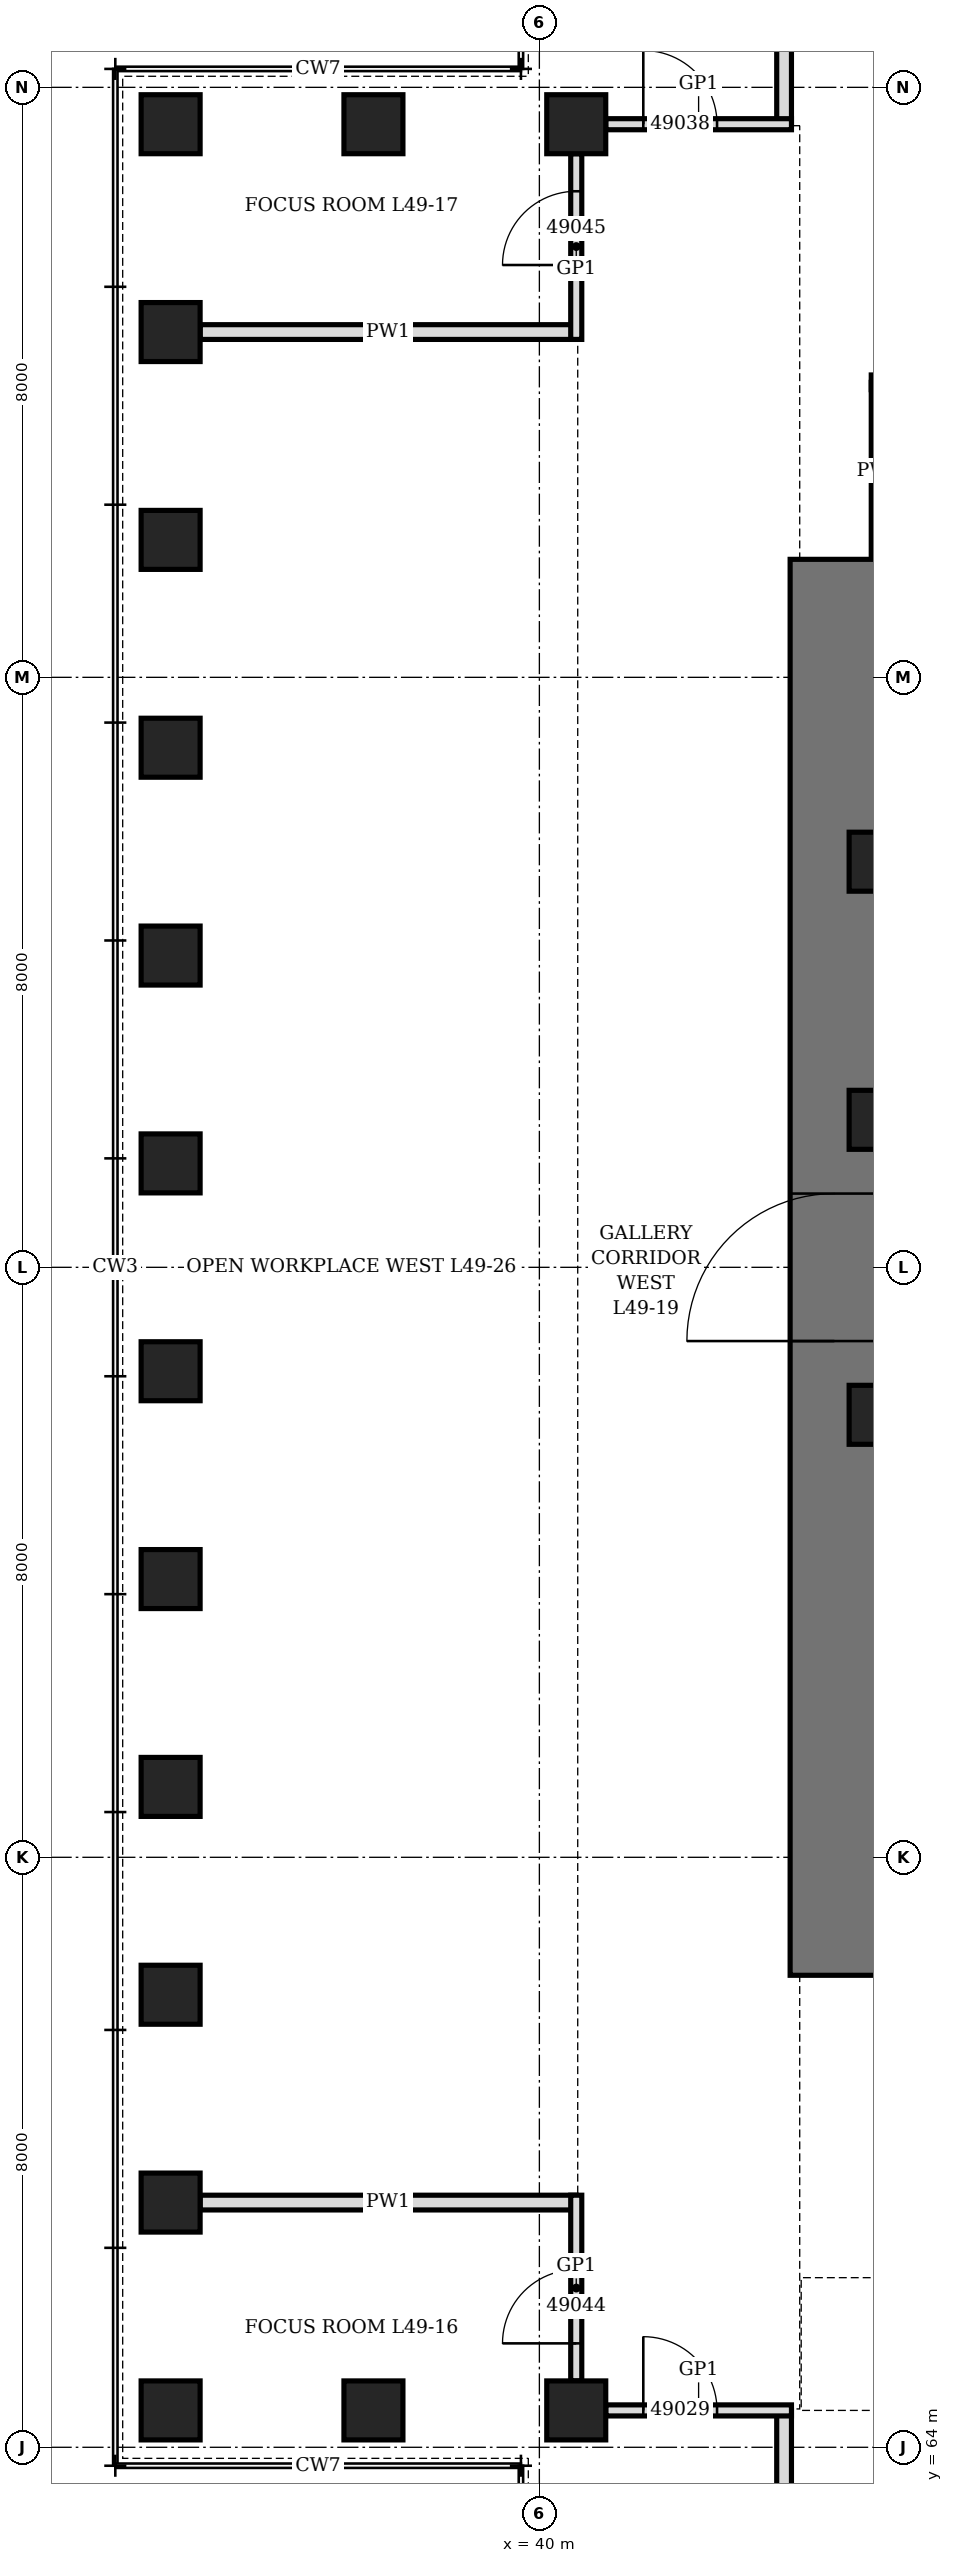
"""IFC4 building model, lengths in metres.
Left out: names, types, materials, properties, quantities, classifications, styles, units other than length and angle.
Written with IfcOpenShell. Run it as: python <this file> out.ifc"""

import sys

from ifc_helpers import new_model, si_unit, direction, frame, frame_2d, origin, origin_2d, place, context, subcontext, project, spatial, rectangle, hollow_rectangle, extrude, element, fill, save


model = new_model("IFC4")
c1 = context("Model", 3, precision=1e-05, world=origin(), true_north=direction((0.0, 1.0)))
c2 = subcontext(c1, "Body", "Model", "MODEL_VIEW")
j1 = project(units=[si_unit("LENGTHUNIT", "METRE"), si_unit("PLANEANGLEUNIT", "RADIAN")], contexts=[c1])
p1 = place(None, origin())
s1 = spatial("IfcSite", under=j1, at=p1, CompositionType="ELEMENT")
p2 = place(p1, origin())
s2 = spatial("IfcBuilding", under=s1, at=p2, CompositionType="ELEMENT")
p3 = place(p2, frame((0.0, 0.0, 219.1)))
s3 = spatial("IfcBuildingStorey", under=s2, at=p3, CompositionType="ELEMENT", Elevation=219.1)
for number, where, z_axis, x_axis in (
    (1, (40.5, 95.5, 0.0), (0.0, 0.0, 1.0), (1.0, 0.0, 0.0)),
    (2, (37.75, 95.5, 0.0), (0.0, 0.0, 1.0), (1.0, 0.0, 0.0)),
    (3, (35.0, 95.5, 0.0), (0.0, 0.0, 1.0), (0.0, 1.0, 0.0)),
    (4, (35.0, 92.682, 0.0), (0.0, 0.0, 1.0), (0.0, 1.0, 0.0)),
    (5, (35.0, 89.864, 0.0), (0.0, 0.0, 1.0), (0.0, 1.0, 0.0)),
    (6, (35.0, 87.045, 0.0), (0.0, 0.0, 1.0), (0.0, 1.0, 0.0)),
    (7, (35.0, 84.227, 0.0), (0.0, 0.0, 1.0), (0.0, 1.0, 0.0)),
    (8, (35.0, 81.409, 0.0), (0.0, 0.0, 1.0), (0.0, 1.0, 0.0)),
    (9, (35.0, 78.591, 0.0), (0.0, 0.0, 1.0), (0.0, 1.0, 0.0)),
    (10, (35.0, 75.773, 0.0), (0.0, 0.0, 1.0), (0.0, 1.0, 0.0)),
    (11, (35.0, 72.955, 0.0), (0.0, 0.0, 1.0), (0.0, 1.0, 0.0)),
    (12, (35.0, 70.136, 0.0), (0.0, 0.0, 1.0), (0.0, 1.0, 0.0)),
    (13, (35.0, 67.318, 0.0), (0.0, 0.0, 1.0), (0.0, 1.0, 0.0)),
    (14, (35.0, 64.5, 0.0), (0.0, 0.0, 1.0), (1.0, 0.0, 0.0)),
    (15, (37.75, 64.5, 0.0), (0.0, 0.0, 1.0), (1.0, 0.0, 0.0)),
    (16, (40.5, 64.5, 0.0), (0.0, 0.0, 1.0), (0.0, 1.0, 0.0)),
):
    element("IfcColumn", number, at=place(p3, frame(where, z_axis=z_axis, x_axis=x_axis)), inside=s3, PredefinedType="COLUMN", context=c2, shape_type="SweptSolid", body=[
        extrude(hollow_rectangle(XDim=0.8, YDim=0.8, WallThickness=0.08, at=origin_2d()), origin(), (0.0, 0.0, 1.0), 4.2),
    ])
p4 = place(p3, frame((44.0, 70.4, 0.0), z_axis=(0.0, 0.0, 1.0), x_axis=(0.0, 1.0, 0.0)))
e17 = element("IfcWall", 17, at=p4, inside=s3, PredefinedType="SHEAR", context=c2, shape_type="SweptSolid", body=[
    extrude(rectangle(XDim=19.2, YDim=1.2, at=frame_2d((9.6, 0.0))), origin(), (0.0, 0.0, 1.0), 4.2),
])
p5 = place(p4, frame((8.6, 0.0, 0.0)))
e18 = element("IfcOpeningElement", 18, at=p5, cuts=e17, PredefinedType="OPENING", context=c2, shape_type="SweptSolid", body=[
    extrude(rectangle(XDim=2.0, YDim=2.4, at=frame_2d((1.0, 1.2))), frame((0.0, 0.61, 0.0), z_axis=(0.0, -1.0, 0.0), x_axis=(1.0, 0.0, 0.0)), (0.0, 0.0, 1.0), 1.22),
])
for number, where, z_axis, x_axis in (
    (19, (44.6, 78.0, 0.0), (0.0, 0.0, 1.0), (1.0, 0.0, 0.0)),
    (20, (44.6, 82.0, 0.0), (0.0, 0.0, 1.0), (1.0, 0.0, 0.0)),
    (21, (44.6, 85.5, 0.0), (0.0, 0.0, 1.0), (1.0, 0.0, 0.0)),
):
    element("IfcColumn", number, at=place(p3, frame(where, z_axis=z_axis, x_axis=x_axis)), inside=s3, PredefinedType="COLUMN", context=c2, shape_type="SweptSolid", body=[
        extrude(hollow_rectangle(XDim=0.8, YDim=0.8, WallThickness=0.1, at=origin_2d()), origin(), (0.0, 0.0, 1.0), 4.2),
    ])
for number, where, z_axis, x_axis in (
    (22, (43.318, 59.4, 0.0), (0.0, 0.0, 1.0), (0.0, 1.0, 0.0)),
    (23, (43.318, 95.5, 0.0), (0.0, 0.0, 1.0), (0.0, 1.0, 0.0)),
    (24, (35.4, 67.318, 0.0), (0.0, 0.0, 1.0), (1.0, 0.0, 0.0)),
    (25, (35.4, 92.682, 0.0), (0.0, 0.0, 1.0), (1.0, 0.0, 0.0)),
):
    element("IfcWall", number, at=place(p3, frame(where, z_axis=z_axis, x_axis=x_axis)), inside=s3, PredefinedType="PARTITIONING", context=c2, shape_type="SweptSolid", body=[
        extrude(rectangle(XDim=5.1, YDim=0.2, at=frame_2d((2.55, 0.0))), origin(), (0.0, 0.0, 1.0), 3.428),
    ])
p6 = place(p3, frame((44.6, 89.6, 0.0), z_axis=(0.0, 0.0, 1.0), x_axis=(0.0, 1.0, 0.0)))
e26 = element("IfcWall", 26, at=p6, inside=s3, PredefinedType="PARTITIONING", context=c2, shape_type="SweptSolid", body=[
    extrude(rectangle(XDim=2.4, YDim=0.2, at=frame_2d((1.2, 0.0))), origin(), (0.0, 0.0, 1.0), 4.04),
])
p7 = place(p3, frame((40.9, 64.5, 0.0), z_axis=(0.0, 0.0, 1.0), x_axis=(1.0, 0.0, 0.0)))
e27 = element("IfcWall", 27, at=p7, inside=s3, PredefinedType="PARTITIONING", context=c2, shape_type="SweptSolid", body=[
    extrude(rectangle(XDim=2.518, YDim=0.15, at=frame_2d((1.259, 0.0))), origin(), (0.0, 0.0, 1.0), 4.04),
])
p8 = place(p7, frame((0.509, 0.0, 0.0)))
e28 = element("IfcOpeningElement", 28, at=p8, cuts=e27, PredefinedType="OPENING", context=c2, shape_type="SweptSolid", body=[
    extrude(rectangle(XDim=1.0, YDim=2.4, at=frame_2d((0.5, 1.2))), frame((0.0, 0.085, 0.0), z_axis=(0.0, -1.0, 0.0), x_axis=(1.0, 0.0, 0.0)), (0.0, 0.0, 1.0), 0.17),
])
p9 = place(p3, frame((44.5, 92.0, 0.0), z_axis=(0.0, 0.0, 1.0), x_axis=(1.0, 0.0, 0.0)))
e29 = element("IfcWall", 29, at=p9, inside=s3, PredefinedType="PARTITIONING", context=c2, shape_type="SweptSolid", body=[
    extrude(rectangle(XDim=6.4, YDim=0.2, at=frame_2d((3.2, 0.0))), origin(), (0.0, 0.0, 1.0), 4.04),
])
p10 = place(p9, frame((2.7, 0.0, 0.0)))
e30 = element("IfcOpeningElement", 30, at=p10, cuts=e29, PredefinedType="OPENING", context=c2, shape_type="SweptSolid", body=[
    extrude(rectangle(XDim=1.0, YDim=2.1, at=frame_2d((0.5, 1.05))), frame((0.0, 0.11, 0.0), z_axis=(0.0, -1.0, 0.0), x_axis=(1.0, 0.0, 0.0)), (0.0, 0.0, 1.0), 0.22),
])
p11 = place(p3, frame((40.9, 95.5, 0.0), z_axis=(0.0, 0.0, 1.0), x_axis=(1.0, 0.0, 0.0)))
e31 = element("IfcWall", 31, at=p11, inside=s3, PredefinedType="PARTITIONING", context=c2, shape_type="SweptSolid", body=[
    extrude(rectangle(XDim=2.518, YDim=0.15, at=frame_2d((1.259, 0.0))), origin(), (0.0, 0.0, 1.0), 4.04),
])
p12 = place(p11, frame((0.509, 0.0, 0.0)))
e32 = element("IfcOpeningElement", 32, at=p12, cuts=e31, PredefinedType="OPENING", context=c2, shape_type="SweptSolid", body=[
    extrude(rectangle(XDim=1.0, YDim=2.4, at=frame_2d((0.5, 1.2))), frame((0.0, 0.085, 0.0), z_axis=(0.0, -1.0, 0.0), x_axis=(1.0, 0.0, 0.0)), (0.0, 0.0, 1.0), 0.17),
])
p13 = place(p3, frame((40.5, 64.9, 0.0), z_axis=(0.0, 0.0, 1.0), x_axis=(0.0, 1.0, 0.0)))
e33 = element("IfcWall", 33, at=p13, inside=s3, PredefinedType="PARTITIONING", context=c2, shape_type="SweptSolid", body=[
    extrude(rectangle(XDim=2.518, YDim=0.15, at=frame_2d((1.259, 0.0))), origin(), (0.0, 0.0, 1.0), 4.04),
])
p14 = place(p13, frame((0.509, 0.0, 0.0)))
e34 = element("IfcOpeningElement", 34, at=p14, cuts=e33, PredefinedType="OPENING", context=c2, shape_type="SweptSolid", body=[
    extrude(rectangle(XDim=1.0, YDim=2.4, at=frame_2d((0.5, 1.2))), frame((0.0, 0.085, 0.0), z_axis=(0.0, -1.0, 0.0), x_axis=(1.0, 0.0, 0.0)), (0.0, 0.0, 1.0), 0.17),
])
p15 = place(p3, frame((40.5, 92.582, 0.0), z_axis=(0.0, 0.0, 1.0), x_axis=(0.0, 1.0, 0.0)))
e35 = element("IfcWall", 35, at=p15, inside=s3, PredefinedType="PARTITIONING", context=c2, shape_type="SweptSolid", body=[
    extrude(rectangle(XDim=2.518, YDim=0.15, at=frame_2d((1.259, 0.0))), origin(), (0.0, 0.0, 1.0), 4.04),
])
p16 = place(p15, frame((1.009, 0.0, 0.0)))
e36 = element("IfcOpeningElement", 36, at=p16, cuts=e35, PredefinedType="OPENING", context=c2, shape_type="SweptSolid", body=[
    extrude(rectangle(XDim=1.0, YDim=2.4, at=frame_2d((0.5, 1.2))), frame((0.0, 0.085, 0.0), z_axis=(0.0, -1.0, 0.0), x_axis=(1.0, 0.0, 0.0)), (0.0, 0.0, 1.0), 0.17),
])
p17 = place(p5, origin())
e37 = element("IfcDoor", 37, at=p17, inside=s3, OperationType="DOUBLE_DOOR_SINGLE_SWING", PredefinedType="DOOR", context=c2, shape_type="SweptSolid", body=[
    extrude(rectangle(XDim=2.0, YDim=2.4, at=frame_2d((1.0, 1.2))), frame((0.0, 0.35, 0.0), z_axis=(0.0, -1.0, 0.0), x_axis=(1.0, 0.0, 0.0)), (0.0, 0.0, 1.0), 0.7),
])
fill(e18, e37)
p18 = place(p8, origin())
e38 = element("IfcDoor", 38, at=p18, inside=s3, OperationType="SINGLE_SWING_RIGHT", PredefinedType="DOOR", context=c2, shape_type="SweptSolid", body=[
    extrude(rectangle(XDim=1.0, YDim=2.4, at=frame_2d((0.5, 1.2))), frame((0.0, 0.075, 0.0), z_axis=(0.0, -1.0, 0.0), x_axis=(1.0, 0.0, 0.0)), (0.0, 0.0, 1.0), 0.149),
])
fill(e28, e38)
p19 = place(p12, origin())
e39 = element("IfcDoor", 39, at=p19, inside=s3, OperationType="SINGLE_SWING_RIGHT", PredefinedType="DOOR", context=c2, shape_type="SweptSolid", body=[
    extrude(rectangle(XDim=1.0, YDim=2.4, at=frame_2d((0.5, 1.2))), frame((0.0, 0.075, 0.0), z_axis=(0.0, -1.0, 0.0), x_axis=(1.0, 0.0, 0.0)), (0.0, 0.0, 1.0), 0.149),
])
fill(e32, e39)
p20 = place(p14, origin())
e40 = element("IfcDoor", 40, at=p20, inside=s3, OperationType="SINGLE_SWING_RIGHT", PredefinedType="DOOR", context=c2, shape_type="SweptSolid", body=[
    extrude(rectangle(XDim=1.0, YDim=2.4, at=frame_2d((0.5, 1.2))), frame((0.0, 0.075, 0.0), z_axis=(0.0, -1.0, 0.0), x_axis=(1.0, 0.0, 0.0)), (0.0, 0.0, 1.0), 0.149),
])
fill(e34, e40)
p21 = place(p16, origin())
e41 = element("IfcDoor", 41, at=p21, inside=s3, OperationType="SINGLE_SWING_RIGHT", PredefinedType="DOOR", context=c2, shape_type="SweptSolid", body=[
    extrude(rectangle(XDim=1.0, YDim=2.4, at=frame_2d((0.5, 1.2))), frame((0.0, 0.075, 0.0), z_axis=(0.0, -1.0, 0.0), x_axis=(1.0, 0.0, 0.0)), (0.0, 0.0, 1.0), 0.149),
])
fill(e36, e41)
save(model, sys.argv[1])
